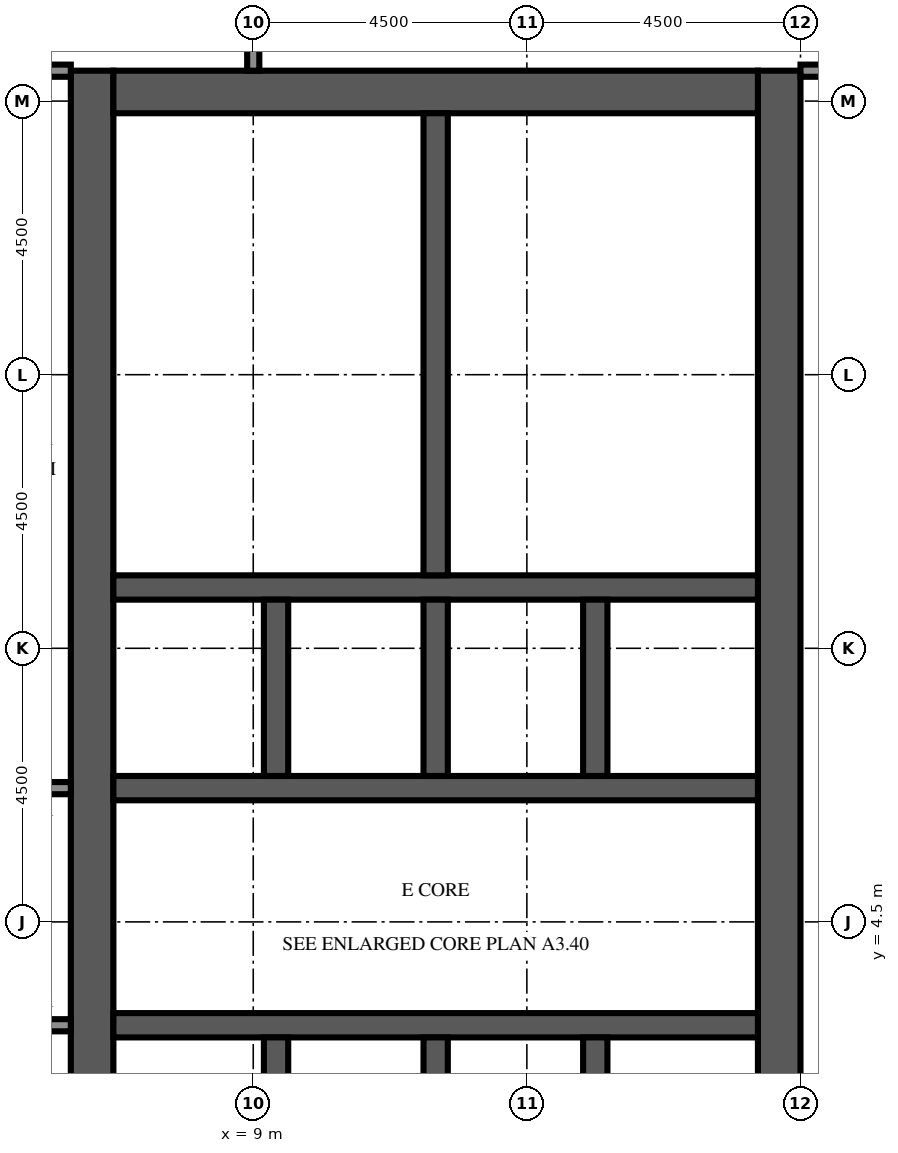
"""IFC4 building model, lengths in metres.
Left out: names, types, materials, properties, quantities, classifications, styles, units other than length and angle.
Written with IfcOpenShell. Run it as: python <this file> out.ifc"""

import sys

from ifc_helpers import new_model, si_unit, direction, frame, frame_2d, origin, place, context, subcontext, project, spatial, rectangle, extrude, element, fill, save


model = new_model("IFC4")
c1 = context("Model", 3, precision=1e-05, world=origin(), true_north=direction((0.0, 1.0)))
c2 = subcontext(c1, "Body", "Model", "MODEL_VIEW")
j1 = project(units=[si_unit("LENGTHUNIT", "METRE"), si_unit("PLANEANGLEUNIT", "RADIAN")], contexts=[c1])
p1 = place(None, origin())
s1 = spatial("IfcSite", under=j1, at=p1, CompositionType="ELEMENT")
p2 = place(p1, origin())
s2 = spatial("IfcBuilding", under=s1, at=p2, CompositionType="ELEMENT")
p3 = place(p2, frame((0.0, 0.0, 278.6)))
s3 = spatial("IfcBuildingStorey", under=s2, at=p3, CompositionType="ELEMENT", Elevation=278.6)
p4 = place(p3, frame((6.35, -9.0, 0.0), z_axis=(0.0, 0.0, 1.0), x_axis=(0.0, 1.0, 0.0)))
e1 = element("IfcWall", 1, at=p4, inside=s3, PredefinedType="SHEAR", context=c2, shape_type="SweptSolid", body=[
    extrude(rectangle(XDim=27.5, YDim=0.7, at=frame_2d((13.75, 0.0))), origin(), (0.0, 0.0, 1.0), 4.1),
])
p5 = place(p4, frame((12.55, 0.0, 0.0)))
e2 = element("IfcOpeningElement", 2, at=p5, cuts=e1, PredefinedType="OPENING", context=c2, shape_type="SweptSolid", body=[
    extrude(rectangle(XDim=2.4, YDim=2.4, at=frame_2d((1.2, 1.2))), frame((0.0, 0.36, 0.0), z_axis=(0.0, -1.0, 0.0), x_axis=(1.0, 0.0, 0.0)), (0.0, 0.0, 1.0), 0.72),
])
p6 = place(p4, frame((3.9, 0.0, 0.0)))
e3 = element("IfcOpeningElement", 3, at=p6, cuts=e1, PredefinedType="OPENING", context=c2, shape_type="SweptSolid", body=[
    extrude(rectangle(XDim=1.2, YDim=2.1, at=frame_2d((0.6, 1.05))), frame((0.0, 0.36, 0.0), z_axis=(0.0, -1.0, 0.0), x_axis=(1.0, 0.0, 0.0)), (0.0, 0.0, 1.0), 0.72),
])
p7 = place(p4, frame((19.46, 0.0, 0.0)))
e4 = element("IfcOpeningElement", 4, at=p7, cuts=e1, PredefinedType="OPENING", context=c2, shape_type="SweptSolid", body=[
    extrude(rectangle(XDim=1.0, YDim=2.1, at=frame_2d((0.5, 1.05))), frame((0.0, 0.36, 0.0), z_axis=(0.0, -1.0, 0.0), x_axis=(1.0, 0.0, 0.0)), (0.0, 0.0, 1.0), 0.72),
])
p8 = place(p4, frame((21.17, 0.0, 0.0)))
e5 = element("IfcOpeningElement", 5, at=p8, cuts=e1, PredefinedType="OPENING", context=c2, shape_type="SweptSolid", body=[
    extrude(rectangle(XDim=1.0, YDim=2.1, at=frame_2d((0.5, 1.05))), frame((0.0, 0.36, 0.0), z_axis=(0.0, -1.0, 0.0), x_axis=(1.0, 0.0, 0.0)), (0.0, 0.0, 1.0), 0.72),
])
p9 = place(p4, frame((23.26, 0.0, 0.0)))
e6 = element("IfcOpeningElement", 6, at=p9, cuts=e1, PredefinedType="OPENING", context=c2, shape_type="SweptSolid", body=[
    extrude(rectangle(XDim=1.0, YDim=2.1, at=frame_2d((0.5, 1.05))), frame((0.0, 0.36, 0.0), z_axis=(0.0, -1.0, 0.0), x_axis=(1.0, 0.0, 0.0)), (0.0, 0.0, 1.0), 0.72),
])
p10 = place(p4, frame((25.35, 0.0, 0.0)))
e7 = element("IfcOpeningElement", 7, at=p10, cuts=e1, PredefinedType="OPENING", context=c2, shape_type="SweptSolid", body=[
    extrude(rectangle(XDim=1.0, YDim=2.1, at=frame_2d((0.5, 1.05))), frame((0.0, 0.36, 0.0), z_axis=(0.0, -1.0, 0.0), x_axis=(1.0, 0.0, 0.0)), (0.0, 0.0, 1.0), 0.72),
])
p11 = place(p3, frame((17.65, -9.0, 0.0), z_axis=(0.0, 0.0, 1.0), x_axis=(0.0, 1.0, 0.0)))
e8 = element("IfcWall", 8, at=p11, inside=s3, PredefinedType="SHEAR", context=c2, shape_type="SweptSolid", body=[
    extrude(rectangle(XDim=27.5, YDim=0.7, at=frame_2d((13.75, 0.0))), origin(), (0.0, 0.0, 1.0), 4.1),
])
p12 = place(p11, frame((12.55, 0.0, 0.0)))
e9 = element("IfcOpeningElement", 9, at=p12, cuts=e8, PredefinedType="OPENING", context=c2, shape_type="SweptSolid", body=[
    extrude(rectangle(XDim=2.4, YDim=2.4, at=frame_2d((1.2, 1.2))), frame((0.0, 0.36, 0.0), z_axis=(0.0, -1.0, 0.0), x_axis=(1.0, 0.0, 0.0)), (0.0, 0.0, 1.0), 0.72),
])
p13 = place(p11, frame((6.825, 0.0, 0.0)))
e10 = element("IfcOpeningElement", 10, at=p13, cuts=e8, PredefinedType="OPENING", context=c2, shape_type="SweptSolid", body=[
    extrude(rectangle(XDim=1.2, YDim=2.1, at=frame_2d((0.6, 1.05))), frame((0.0, 0.36, 0.0), z_axis=(0.0, -1.0, 0.0), x_axis=(1.0, 0.0, 0.0)), (0.0, 0.0, 1.0), 0.72),
])
p14 = place(p11, frame((19.475, 0.0, 0.0)))
e11 = element("IfcOpeningElement", 11, at=p14, cuts=e8, PredefinedType="OPENING", context=c2, shape_type="SweptSolid", body=[
    extrude(rectangle(XDim=1.2, YDim=2.1, at=frame_2d((0.6, 1.05))), frame((0.0, 0.36, 0.0), z_axis=(0.0, -1.0, 0.0), x_axis=(1.0, 0.0, 0.0)), (0.0, 0.0, 1.0), 0.72),
])
p15 = place(p3, frame((6.7, 18.15, 0.0), z_axis=(0.0, 0.0, 1.0), x_axis=(1.0, 0.0, 0.0)))
e12 = element("IfcWall", 12, at=p15, inside=s3, PredefinedType="SHEAR", context=c2, shape_type="SweptSolid", body=[
    extrude(rectangle(XDim=10.6, YDim=0.7, at=frame_2d((5.3, 0.0))), origin(), (0.0, 0.0, 1.0), 4.1),
])
p16 = place(p3, frame((6.7, 2.8, 0.0), z_axis=(0.0, 0.0, 1.0), x_axis=(1.0, 0.0, 0.0)))
e13 = element("IfcWall", 13, at=p16, inside=s3, PredefinedType="SHEAR", context=c2, shape_type="SweptSolid", body=[
    extrude(rectangle(XDim=10.6, YDim=0.4, at=frame_2d((5.3, 0.0))), origin(), (0.0, 0.0, 1.0), 4.1),
])
p17 = place(p16, frame((0.688, 0.0, 0.0)))
e14 = element("IfcOpeningElement", 14, at=p17, cuts=e13, PredefinedType="OPENING", context=c2, shape_type="SweptSolid", body=[
    extrude(rectangle(XDim=1.1, YDim=2.1, at=frame_2d((0.55, 1.05))), frame((0.0, 0.21, 0.0), z_axis=(0.0, -1.0, 0.0), x_axis=(1.0, 0.0, 0.0)), (0.0, 0.0, 1.0), 0.42),
])
p18 = place(p16, frame((3.438, 0.0, 0.0)))
e15 = element("IfcOpeningElement", 15, at=p18, cuts=e13, PredefinedType="OPENING", context=c2, shape_type="SweptSolid", body=[
    extrude(rectangle(XDim=1.1, YDim=2.1, at=frame_2d((0.55, 1.05))), frame((0.0, 0.21, 0.0), z_axis=(0.0, -1.0, 0.0), x_axis=(1.0, 0.0, 0.0)), (0.0, 0.0, 1.0), 0.42),
])
p19 = place(p16, frame((6.113, 0.0, 0.0)))
e16 = element("IfcOpeningElement", 16, at=p19, cuts=e13, PredefinedType="OPENING", context=c2, shape_type="SweptSolid", body=[
    extrude(rectangle(XDim=1.0, YDim=2.1, at=frame_2d((0.5, 1.05))), frame((0.0, 0.21, 0.0), z_axis=(0.0, -1.0, 0.0), x_axis=(1.0, 0.0, 0.0)), (0.0, 0.0, 1.0), 0.42),
])
p20 = place(p16, frame((8.863, 0.0, 0.0)))
e17 = element("IfcOpeningElement", 17, at=p20, cuts=e13, PredefinedType="OPENING", context=c2, shape_type="SweptSolid", body=[
    extrude(rectangle(XDim=1.0, YDim=2.1, at=frame_2d((0.5, 1.05))), frame((0.0, 0.21, 0.0), z_axis=(0.0, -1.0, 0.0), x_axis=(1.0, 0.0, 0.0)), (0.0, 0.0, 1.0), 0.42),
])
p21 = place(p3, frame((6.7, 6.7, 0.0), z_axis=(0.0, 0.0, 1.0), x_axis=(1.0, 0.0, 0.0)))
e18 = element("IfcWall", 18, at=p21, inside=s3, PredefinedType="SHEAR", context=c2, shape_type="SweptSolid", body=[
    extrude(rectangle(XDim=10.6, YDim=0.4, at=frame_2d((5.3, 0.0))), origin(), (0.0, 0.0, 1.0), 4.1),
])
p22 = place(p21, frame((3.438, 0.0, 0.0)))
e19 = element("IfcOpeningElement", 19, at=p22, cuts=e18, PredefinedType="OPENING", context=c2, shape_type="SweptSolid", body=[
    extrude(rectangle(XDim=1.1, YDim=2.1, at=frame_2d((0.55, 1.05))), frame((0.0, 0.21, 0.0), z_axis=(0.0, -1.0, 0.0), x_axis=(1.0, 0.0, 0.0)), (0.0, 0.0, 1.0), 0.42),
])
p23 = place(p21, frame((6.062, 0.0, 0.0)))
e20 = element("IfcOpeningElement", 20, at=p23, cuts=e18, PredefinedType="OPENING", context=c2, shape_type="SweptSolid", body=[
    extrude(rectangle(XDim=1.1, YDim=2.1, at=frame_2d((0.55, 1.05))), frame((0.0, 0.21, 0.0), z_axis=(0.0, -1.0, 0.0), x_axis=(1.0, 0.0, 0.0)), (0.0, 0.0, 1.0), 0.42),
])
p24 = place(p21, frame((8.812, 0.0, 0.0)))
e21 = element("IfcOpeningElement", 21, at=p24, cuts=e18, PredefinedType="OPENING", context=c2, shape_type="SweptSolid", body=[
    extrude(rectangle(XDim=1.1, YDim=2.1, at=frame_2d((0.55, 1.05))), frame((0.0, 0.21, 0.0), z_axis=(0.0, -1.0, 0.0), x_axis=(1.0, 0.0, 0.0)), (0.0, 0.0, 1.0), 0.42),
])
p25 = place(p21, frame((0.738, 0.0, 0.0)))
e22 = element("IfcOpeningElement", 22, at=p25, cuts=e18, PredefinedType="OPENING", context=c2, shape_type="SweptSolid", body=[
    extrude(rectangle(XDim=1.0, YDim=2.1, at=frame_2d((0.5, 1.05))), frame((0.0, 0.21, 0.0), z_axis=(0.0, -1.0, 0.0), x_axis=(1.0, 0.0, 0.0)), (0.0, 0.0, 1.0), 0.42),
])
p26 = place(p3, frame((6.7, 10.0, 0.0), z_axis=(0.0, 0.0, 1.0), x_axis=(1.0, 0.0, 0.0)))
e23 = element("IfcWall", 23, at=p26, inside=s3, PredefinedType="SHEAR", context=c2, shape_type="SweptSolid", body=[
    extrude(rectangle(XDim=10.6, YDim=0.4, at=frame_2d((5.3, 0.0))), origin(), (0.0, 0.0, 1.0), 4.1),
])
for number, where, z_axis, x_axis in (
    (24, (9.375, -0.3, 0.0), (0.0, 0.0, 1.0), (0.0, 1.0, 0.0)),
    (25, (9.375, 6.9, 0.0), (0.0, 0.0, 1.0), (0.0, 1.0, 0.0)),
    (26, (12.0, -0.3, 0.0), (0.0, 0.0, 1.0), (0.0, 1.0, 0.0)),
    (27, (12.0, 6.9, 0.0), (0.0, 0.0, 1.0), (0.0, 1.0, 0.0)),
    (28, (14.625, -0.3, 0.0), (0.0, 0.0, 1.0), (0.0, 1.0, 0.0)),
    (29, (14.625, 6.9, 0.0), (0.0, 0.0, 1.0), (0.0, 1.0, 0.0)),
):
    element("IfcWall", number, at=place(p3, frame(where, z_axis=z_axis, x_axis=x_axis)), inside=s3, PredefinedType="SHEAR", context=c2, shape_type="SweptSolid", body=[
        extrude(rectangle(XDim=2.9, YDim=0.4, at=frame_2d((1.45, 0.0))), origin(), (0.0, 0.0, 1.0), 4.1),
    ])
p27 = place(p3, frame((12.0, 10.2, 0.0), z_axis=(0.0, 0.0, 1.0), x_axis=(0.0, 1.0, 0.0)))
e30 = element("IfcWall", 30, at=p27, inside=s3, PredefinedType="SHEAR", context=c2, shape_type="SweptSolid", body=[
    extrude(rectangle(XDim=7.6, YDim=0.4, at=frame_2d((3.8, 0.0))), origin(), (0.0, 0.0, 1.0), 4.1),
])
for number, where, z_axis, x_axis in (
    (31, (6.7, 11.72, 0.0), (0.0, 0.0, 1.0), (1.0, 0.0, 0.0)),
    (32, (6.7, 13.62, 0.0), (0.0, 0.0, 1.0), (1.0, 0.0, 0.0)),
    (33, (6.7, 15.9, 0.0), (0.0, 0.0, 1.0), (1.0, 0.0, 0.0)),
):
    element("IfcWall", number, at=place(p3, frame(where, z_axis=z_axis, x_axis=x_axis)), inside=s3, PredefinedType="PARTITIONING", context=c2, shape_type="SweptSolid", body=[
        extrude(rectangle(XDim=5.1, YDim=0.1, at=frame_2d((2.55, 0.0))), origin(), (0.0, 0.0, 1.0), 3.65),
    ])
p28 = place(p3, frame((9.0, 18.5, 0.0), z_axis=(0.0, 0.0, 1.0), x_axis=(0.0, 1.0, 0.0)))
e34 = element("IfcWall", 34, at=p28, inside=s3, PredefinedType="PARTITIONING", context=c2, shape_type="SweptSolid", body=[
    extrude(rectangle(XDim=3.5, YDim=0.2, at=frame_2d((1.75, 0.0))), origin(), (0.0, 0.0, 1.0), 3.65),
])
for number, where, z_axis, x_axis in (
    (35, (4.5, 2.8, 0.0), (0.0, 0.0, 1.0), (1.0, 0.0, 0.0)),
    (36, (4.5, 6.7, 0.0), (0.0, 0.0, 1.0), (1.0, 0.0, 0.0)),
):
    element("IfcWall", number, at=place(p3, frame(where, z_axis=z_axis, x_axis=x_axis)), inside=s3, PredefinedType="PARTITIONING", context=c2, shape_type="SweptSolid", body=[
        extrude(rectangle(XDim=1.5, YDim=0.2, at=frame_2d((0.75, 0.0))), origin(), (0.0, 0.0, 1.0), 3.65),
    ])
p29 = place(p3, frame((1.5, 18.5, 0.0), z_axis=(0.0, 0.0, 1.0), x_axis=(1.0, 0.0, 0.0)))
e37 = element("IfcWall", 37, at=p29, inside=s3, PredefinedType="PARTITIONING", context=c2, shape_type="SweptSolid", body=[
    extrude(rectangle(XDim=4.5, YDim=0.2, at=frame_2d((2.25, 0.0))), origin(), (0.0, 0.0, 1.0), 3.65),
])
p30 = place(p29, frame((1.1, 0.0, 0.0)))
e38 = element("IfcOpeningElement", 38, at=p30, cuts=e37, PredefinedType="OPENING", context=c2, shape_type="SweptSolid", body=[
    extrude(rectangle(XDim=1.0, YDim=2.1, at=frame_2d((0.5, 1.05))), frame((0.0, 0.11, 0.0), z_axis=(0.0, -1.0, 0.0), x_axis=(1.0, 0.0, 0.0)), (0.0, 0.0, 1.0), 0.22),
])
p31 = place(p3, frame((18.0, 18.5, 0.0), z_axis=(0.0, 0.0, 1.0), x_axis=(1.0, 0.0, 0.0)))
e39 = element("IfcWall", 39, at=p31, inside=s3, PredefinedType="PARTITIONING", context=c2, shape_type="SweptSolid", body=[
    extrude(rectangle(XDim=4.201, YDim=0.2, at=frame_2d((2.101, 0.0))), origin(), (0.0, 0.0, 1.0), 3.65),
])
p32 = place(p31, frame((2.1, 0.0, 0.0)))
e40 = element("IfcOpeningElement", 40, at=p32, cuts=e39, PredefinedType="OPENING", context=c2, shape_type="SweptSolid", body=[
    extrude(rectangle(XDim=1.0, YDim=2.1, at=frame_2d((0.5, 1.05))), frame((0.0, 0.11, 0.0), z_axis=(0.0, -1.0, 0.0), x_axis=(1.0, 0.0, 0.0)), (0.0, 0.0, 1.0), 0.22),
])
p33 = place(p17, origin())
e41 = element("IfcDoor", 41, at=p33, inside=s3, OperationType="DOUBLE_DOOR_SLIDING", PredefinedType="DOOR", context=c2, shape_type="SweptSolid", body=[
    extrude(rectangle(XDim=1.1, YDim=2.1, at=frame_2d((0.55, 1.05))), frame((0.0, 0.025, 0.0), z_axis=(0.0, -1.0, 0.0), x_axis=(1.0, 0.0, 0.0)), (0.0, 0.0, 1.0), 0.05),
])
fill(e14, e41)
p34 = place(p18, origin())
e42 = element("IfcDoor", 42, at=p34, inside=s3, OperationType="DOUBLE_DOOR_SLIDING", PredefinedType="DOOR", context=c2, shape_type="SweptSolid", body=[
    extrude(rectangle(XDim=1.1, YDim=2.1, at=frame_2d((0.55, 1.05))), frame((0.0, 0.025, 0.0), z_axis=(0.0, -1.0, 0.0), x_axis=(1.0, 0.0, 0.0)), (0.0, 0.0, 1.0), 0.05),
])
fill(e15, e42)
p35 = place(p22, origin())
e43 = element("IfcDoor", 43, at=p35, inside=s3, OperationType="DOUBLE_DOOR_SLIDING", PredefinedType="DOOR", context=c2, shape_type="SweptSolid", body=[
    extrude(rectangle(XDim=1.1, YDim=2.1, at=frame_2d((0.55, 1.05))), frame((0.0, 0.025, 0.0), z_axis=(0.0, -1.0, 0.0), x_axis=(1.0, 0.0, 0.0)), (0.0, 0.0, 1.0), 0.05),
])
fill(e19, e43)
p36 = place(p23, origin())
e44 = element("IfcDoor", 44, at=p36, inside=s3, OperationType="DOUBLE_DOOR_SLIDING", PredefinedType="DOOR", context=c2, shape_type="SweptSolid", body=[
    extrude(rectangle(XDim=1.1, YDim=2.1, at=frame_2d((0.55, 1.05))), frame((0.0, 0.025, 0.0), z_axis=(0.0, -1.0, 0.0), x_axis=(1.0, 0.0, 0.0)), (0.0, 0.0, 1.0), 0.05),
])
fill(e20, e44)
p37 = place(p24, origin())
e45 = element("IfcDoor", 45, at=p37, inside=s3, OperationType="DOUBLE_DOOR_SLIDING", PredefinedType="DOOR", context=c2, shape_type="SweptSolid", body=[
    extrude(rectangle(XDim=1.1, YDim=2.1, at=frame_2d((0.55, 1.05))), frame((0.0, 0.025, 0.0), z_axis=(0.0, -1.0, 0.0), x_axis=(1.0, 0.0, 0.0)), (0.0, 0.0, 1.0), 0.05),
])
fill(e21, e45)
p38 = place(p5, origin())
e46 = element("IfcDoor", 46, at=p38, inside=s3, OperationType="DOUBLE_DOOR_DOUBLE_SWING", PredefinedType="DOOR", context=c2, shape_type="SweptSolid", body=[
    extrude(rectangle(XDim=2.4, YDim=2.4, at=frame_2d((1.2, 1.2))), frame((0.0, 0.025, 0.0), z_axis=(0.0, -1.0, 0.0), x_axis=(1.0, 0.0, 0.0)), (0.0, 0.0, 1.0), 0.05),
])
fill(e2, e46)
p39 = place(p12, origin())
e47 = element("IfcDoor", 47, at=p39, inside=s3, OperationType="DOUBLE_DOOR_DOUBLE_SWING", PredefinedType="DOOR", context=c2, shape_type="SweptSolid", body=[
    extrude(rectangle(XDim=2.4, YDim=2.4, at=frame_2d((1.2, 1.2))), frame((0.0, 0.025, 0.0), z_axis=(0.0, -1.0, 0.0), x_axis=(1.0, 0.0, 0.0)), (0.0, 0.0, 1.0), 0.05),
])
fill(e9, e47)
p40 = place(p14, frame((1.2, 0.0, 0.0), z_axis=(0.0, 0.0, 1.0), x_axis=(-1.0, 0.0, 0.0)))
e48 = element("IfcDoor", 48, at=p40, inside=s3, OperationType="SINGLE_SWING_LEFT", PredefinedType="DOOR", context=c2, shape_type="SweptSolid", body=[
    extrude(rectangle(XDim=1.2, YDim=2.1, at=frame_2d((0.6, 1.05))), frame((0.0, 0.025, 0.0), z_axis=(0.0, -1.0, 0.0), x_axis=(1.0, 0.0, 0.0)), (0.0, 0.0, 1.0), 0.05),
])
fill(e11, e48)
p41 = place(p19, origin())
e49 = element("IfcDoor", 49, at=p41, inside=s3, OperationType="SINGLE_SWING_LEFT", PredefinedType="DOOR", context=c2, shape_type="SweptSolid", body=[
    extrude(rectangle(XDim=1.0, YDim=2.1, at=frame_2d((0.5, 1.05))), frame((0.0, 0.025, 0.0), z_axis=(0.0, -1.0, 0.0), x_axis=(1.0, 0.0, 0.0)), (0.0, 0.0, 1.0), 0.05),
])
fill(e16, e49)
p42 = place(p20, origin())
e50 = element("IfcDoor", 50, at=p42, inside=s3, OperationType="SINGLE_SWING_RIGHT", PredefinedType="DOOR", context=c2, shape_type="SweptSolid", body=[
    extrude(rectangle(XDim=1.0, YDim=2.1, at=frame_2d((0.5, 1.05))), frame((0.0, 0.025, 0.0), z_axis=(0.0, -1.0, 0.0), x_axis=(1.0, 0.0, 0.0)), (0.0, 0.0, 1.0), 0.05),
])
fill(e17, e50)
p43 = place(p25, origin())
e51 = element("IfcDoor", 51, at=p43, inside=s3, OperationType="SINGLE_SWING_LEFT", PredefinedType="DOOR", context=c2, shape_type="SweptSolid", body=[
    extrude(rectangle(XDim=1.0, YDim=2.1, at=frame_2d((0.5, 1.05))), frame((0.0, 0.025, 0.0), z_axis=(0.0, -1.0, 0.0), x_axis=(1.0, 0.0, 0.0)), (0.0, 0.0, 1.0), 0.05),
])
fill(e22, e51)
p44 = place(p7, origin())
e52 = element("IfcDoor", 52, at=p44, inside=s3, OperationType="SINGLE_SWING_RIGHT", PredefinedType="DOOR", context=c2, shape_type="SweptSolid", body=[
    extrude(rectangle(XDim=1.0, YDim=2.1, at=frame_2d((0.5, 1.05))), frame((0.0, -0.275, 0.0), z_axis=(0.0, -1.0, 0.0), x_axis=(1.0, 0.0, 0.0)), (0.0, 0.0, 1.0), 0.05),
])
fill(e4, e52)
p45 = place(p8, origin())
e53 = element("IfcDoor", 53, at=p45, inside=s3, OperationType="SINGLE_SWING_LEFT", PredefinedType="DOOR", context=c2, shape_type="SweptSolid", body=[
    extrude(rectangle(XDim=1.0, YDim=2.1, at=frame_2d((0.5, 1.05))), frame((0.0, -0.275, 0.0), z_axis=(0.0, -1.0, 0.0), x_axis=(1.0, 0.0, 0.0)), (0.0, 0.0, 1.0), 0.05),
])
fill(e5, e53)
p46 = place(p9, origin())
e54 = element("IfcDoor", 54, at=p46, inside=s3, OperationType="SINGLE_SWING_RIGHT", PredefinedType="DOOR", context=c2, shape_type="SweptSolid", body=[
    extrude(rectangle(XDim=1.0, YDim=2.1, at=frame_2d((0.5, 1.05))), frame((0.0, -0.275, 0.0), z_axis=(0.0, -1.0, 0.0), x_axis=(1.0, 0.0, 0.0)), (0.0, 0.0, 1.0), 0.05),
])
fill(e6, e54)
p47 = place(p10, origin())
e55 = element("IfcDoor", 55, at=p47, inside=s3, OperationType="SINGLE_SWING_LEFT", PredefinedType="DOOR", context=c2, shape_type="SweptSolid", body=[
    extrude(rectangle(XDim=1.0, YDim=2.1, at=frame_2d((0.5, 1.05))), frame((0.0, -0.275, 0.0), z_axis=(0.0, -1.0, 0.0), x_axis=(1.0, 0.0, 0.0)), (0.0, 0.0, 1.0), 0.05),
])
fill(e7, e55)
save(model, sys.argv[1])
